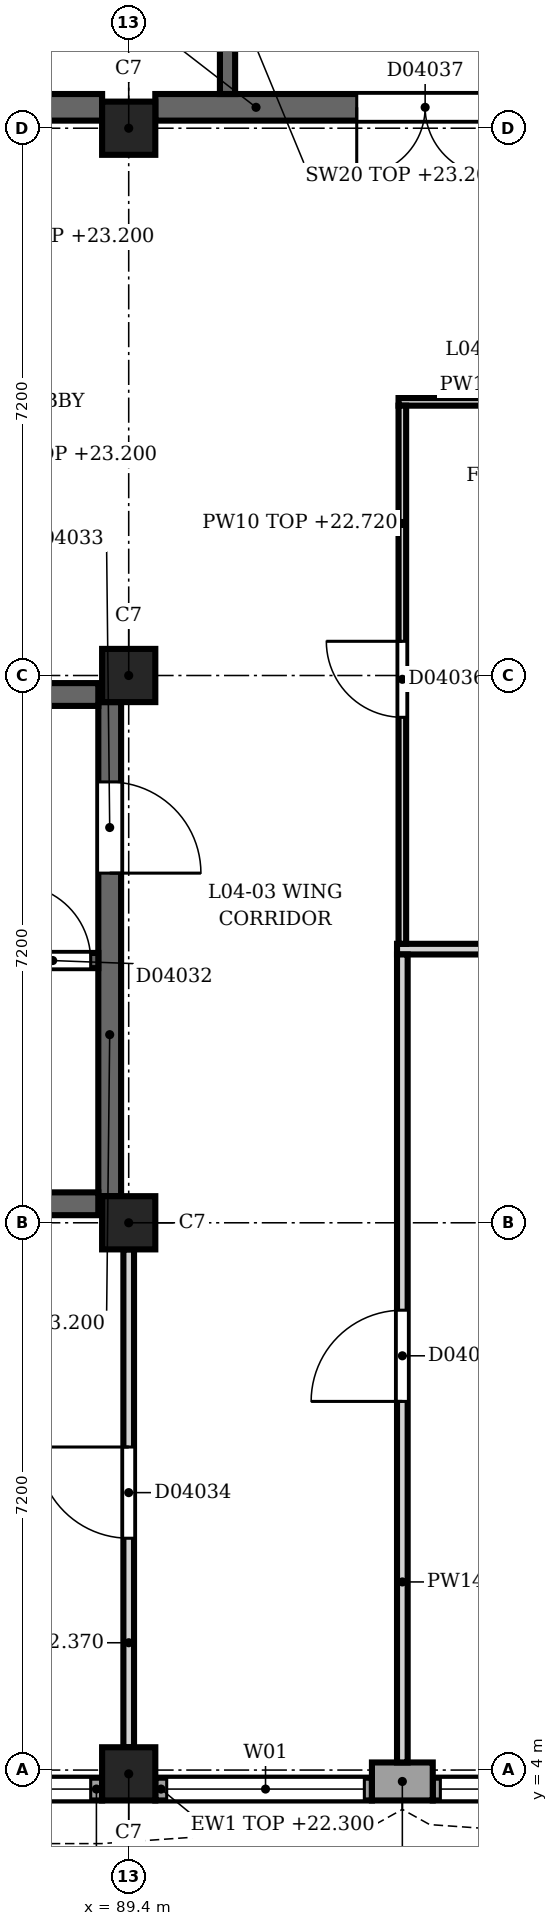
"""IFC4 building model, lengths in metres.
Left out: names, types, materials, properties, quantities, classifications, styles, units other than length and angle.
Written with IfcOpenShell. Run it as: python <this file> out.ifc"""

import sys

from ifc_helpers import new_model, si_unit, direction, frame, frame_2d, origin, origin_2d, place, context, subcontext, project, spatial, rectangle, extrude, element, fill, save


model = new_model("IFC4")
c1 = context("Model", 3, precision=1e-05, world=origin(), true_north=direction((0.0, 1.0)))
c2 = subcontext(c1, "Body", "Model", "MODEL_VIEW")
j1 = project(units=[si_unit("LENGTHUNIT", "METRE"), si_unit("PLANEANGLEUNIT", "RADIAN")], contexts=[c1])
p1 = place(None, origin())
s1 = spatial("IfcSite", under=j1, at=p1, CompositionType="ELEMENT")
p2 = place(p1, origin())
s2 = spatial("IfcBuilding", under=s1, at=p2, CompositionType="ELEMENT")
p3 = place(p2, frame((0.0, 0.0, 18.9)))
s3 = spatial("IfcBuildingStorey", under=s2, at=p3, CompositionType="ELEMENT", Elevation=18.9)
for number, where, z_axis, x_axis in (
    (1, (89.4, 3.95, 0.0), (0.0, 0.0, 1.0), (1.0, 0.0, 0.0)),
    (2, (89.4, 11.2, 0.0), (0.0, 0.0, 1.0), (1.0, 0.0, 0.0)),
    (3, (89.4, 18.4, 0.0), (0.0, 0.0, 1.0), (1.0, 0.0, 0.0)),
    (4, (89.4, 25.6, 0.0), (0.0, 0.0, 1.0), (1.0, 0.0, 0.0)),
):
    element("IfcColumn", number, at=place(p3, frame(where, z_axis=z_axis, x_axis=x_axis)), inside=s3, PredefinedType="COLUMN", context=c2, shape_type="SweptSolid", body=[
        extrude(rectangle(XDim=0.7, YDim=0.7, at=origin_2d()), origin(), (0.0, 0.0, 1.0), 4.5),
    ])
p4 = place(p3, frame((93.4, 3.85, 0.0), z_axis=(0.0, 0.0, 1.0), x_axis=(-1.0, 0.0, 0.0)))
e5 = element("IfcWall", 5, at=p4, inside=s3, PredefinedType="SOLIDWALL", context=c2, shape_type="SweptSolid", body=[
    extrude(rectangle(XDim=0.8, YDim=0.5, at=frame_2d((0.4, 0.0))), origin(), (0.0, 0.0, 1.0), 3.4),
])
p5 = place(p3, frame((96.25, 3.75, 0.0), z_axis=(0.0, 0.0, 1.0), x_axis=(-1.0, 0.0, 0.0)))
e6 = element("IfcWall", 6, at=p5, inside=s3, PredefinedType="SOLIDWALL", context=c2, shape_type="SweptSolid", body=[
    extrude(rectangle(XDim=2.85, YDim=0.3, at=frame_2d((1.425, 0.0))), origin(), (0.0, 0.0, 1.0), 3.4),
])
p6 = place(p5, frame((0.15, 0.0, 0.9)))
e7 = element("IfcOpeningElement", 7, at=p6, cuts=e6, PredefinedType="OPENING", context=c2, shape_type="SweptSolid", body=[
    extrude(rectangle(XDim=2.6, YDim=2.4, at=frame_2d((1.3, 1.2))), frame((0.0, 0.16, 0.0), z_axis=(0.0, -1.0, 0.0), x_axis=(1.0, 0.0, 0.0)), (0.0, 0.0, 1.0), 0.32),
])
p7 = place(p3, frame((92.6, 3.75, 0.0), z_axis=(0.0, 0.0, 1.0), x_axis=(-1.0, 0.0, 0.0)))
e8 = element("IfcWall", 8, at=p7, inside=s3, PredefinedType="SOLIDWALL", context=c2, shape_type="SweptSolid", body=[
    extrude(rectangle(XDim=2.85, YDim=0.3, at=frame_2d((1.425, 0.0))), origin(), (0.0, 0.0, 1.0), 3.4),
])
p8 = place(p7, frame((0.1, 0.0, 0.9)))
e9 = element("IfcOpeningElement", 9, at=p8, cuts=e8, PredefinedType="OPENING", context=c2, shape_type="SweptSolid", body=[
    extrude(rectangle(XDim=2.6, YDim=2.4, at=frame_2d((1.3, 1.2))), frame((0.0, 0.16, 0.0), z_axis=(0.0, -1.0, 0.0), x_axis=(1.0, 0.0, 0.0)), (0.0, 0.0, 1.0), 0.32),
])
p9 = place(p3, frame((89.05, 3.75, 0.0), z_axis=(0.0, 0.0, 1.0), x_axis=(-1.0, 0.0, 0.0)))
e10 = element("IfcWall", 10, at=p9, inside=s3, PredefinedType="SOLIDWALL", context=c2, shape_type="SweptSolid", body=[
    extrude(rectangle(XDim=2.85, YDim=0.3, at=frame_2d((1.425, 0.0))), origin(), (0.0, 0.0, 1.0), 3.4),
])
p10 = place(p9, frame((0.15, 0.0, 0.9)))
e11 = element("IfcOpeningElement", 11, at=p10, cuts=e10, PredefinedType="OPENING", context=c2, shape_type="SweptSolid", body=[
    extrude(rectangle(XDim=2.6, YDim=2.4, at=frame_2d((1.3, 1.2))), frame((0.0, 0.16, 0.0), z_axis=(0.0, -1.0, 0.0), x_axis=(1.0, 0.0, 0.0)), (0.0, 0.0, 1.0), 0.32),
])
p11 = place(p3, frame((82.55, 25.875, 0.0), z_axis=(0.0, 0.0, 1.0), x_axis=(1.0, 0.0, 0.0)))
e12 = element("IfcWall", 12, at=p11, inside=s3, PredefinedType="SHEAR", context=c2, shape_type="SweptSolid", body=[
    extrude(rectangle(XDim=6.5, YDim=0.35, at=frame_2d((3.25, 0.0))), origin(), (0.0, 0.0, 1.0), 4.3),
])
p12 = place(p11, frame((3.85, 0.0, 0.0)))
e13 = element("IfcOpeningElement", 13, at=p12, cuts=e12, PredefinedType="OPENING", context=c2, shape_type="SweptSolid", body=[
    extrude(rectangle(XDim=1.2, YDim=2.1, at=frame_2d((0.6, 1.05))), frame((0.0, 0.185, 0.0), z_axis=(0.0, -1.0, 0.0), x_axis=(1.0, 0.0, 0.0)), (0.0, 0.0, 1.0), 0.37),
])
p13 = place(p3, frame((89.75, 25.875, 0.0), z_axis=(0.0, 0.0, 1.0), x_axis=(1.0, 0.0, 0.0)))
e14 = element("IfcWall", 14, at=p13, inside=s3, PredefinedType="SHEAR", context=c2, shape_type="SweptSolid", body=[
    extrude(rectangle(XDim=6.5, YDim=0.35, at=frame_2d((3.25, 0.0))), origin(), (0.0, 0.0, 1.0), 4.3),
])
p14 = place(p13, frame((2.65, 0.0, 0.0)))
e15 = element("IfcOpeningElement", 15, at=p14, cuts=e14, PredefinedType="OPENING", context=c2, shape_type="SweptSolid", body=[
    extrude(rectangle(XDim=1.8, YDim=2.1, at=frame_2d((0.9, 1.05))), frame((0.0, 0.185, 0.0), z_axis=(0.0, -1.0, 0.0), x_axis=(1.0, 0.0, 0.0)), (0.0, 0.0, 1.0), 0.37),
])
p15 = place(p3, frame((90.7, 26.05, 0.0), z_axis=(0.0, 0.0, 1.0), x_axis=(0.0, 1.0, 0.0)))
e16 = element("IfcWall", 16, at=p15, inside=s3, PredefinedType="SHEAR", context=c2, shape_type="SweptSolid", body=[
    extrude(rectangle(XDim=3.05, YDim=0.2, at=frame_2d((1.525, 0.0))), origin(), (0.0, 0.0, 1.0), 4.3),
])
p16 = place(p3, frame((89.15, 11.55, 0.0), z_axis=(0.0, 0.0, 1.0), x_axis=(0.0, 1.0, 0.0)))
e17 = element("IfcWall", 17, at=p16, inside=s3, PredefinedType="SHEAR", context=c2, shape_type="SweptSolid", body=[
    extrude(rectangle(XDim=6.5, YDim=0.3, at=frame_2d((3.25, 0.0))), origin(), (0.0, 0.0, 1.0), 4.3),
])
p17 = place(p16, frame((4.25, 0.0, 0.0)))
e18 = element("IfcOpeningElement", 18, at=p17, cuts=e17, PredefinedType="OPENING", context=c2, shape_type="SweptSolid", body=[
    extrude(rectangle(XDim=1.2, YDim=2.1, at=frame_2d((0.6, 1.05))), frame((0.0, 0.16, 0.0), z_axis=(0.0, -1.0, 0.0), x_axis=(1.0, 0.0, 0.0)), (0.0, 0.0, 1.0), 0.32),
])
for number, where, z_axis, x_axis in (
    (19, (82.6, 11.45, 0.0), (0.0, 0.0, 1.0), (1.0, 0.0, 0.0)),
    (20, (82.6, 18.15, 0.0), (0.0, 0.0, 1.0), (1.0, 0.0, 0.0)),
):
    element("IfcWall", number, at=place(p3, frame(where, z_axis=z_axis, x_axis=x_axis)), inside=s3, PredefinedType="SHEAR", context=c2, shape_type="SweptSolid", body=[
        extrude(rectangle(XDim=6.4, YDim=0.3, at=frame_2d((3.2, 0.0))), origin(), (0.0, 0.0, 1.0), 4.3),
    ])
p18 = place(p3, frame((89.0, 14.65, 0.0), z_axis=(0.0, 0.0, 1.0), x_axis=(-1.0, 0.0, 0.0)))
e21 = element("IfcWall", 21, at=p18, inside=s3, PredefinedType="SHEAR", context=c2, shape_type="SweptSolid", body=[
    extrude(rectangle(XDim=6.4, YDim=0.2, at=frame_2d((3.2, 0.0))), origin(), (0.0, 0.0, 1.0), 4.3),
])
p19 = place(p18, frame((0.1, 0.0, 0.0)))
e22 = element("IfcOpeningElement", 22, at=p19, cuts=e21, PredefinedType="OPENING", context=c2, shape_type="SweptSolid", body=[
    extrude(rectangle(XDim=1.0, YDim=2.1, at=frame_2d((0.5, 1.05))), frame((0.0, 0.11, 0.0), z_axis=(0.0, -1.0, 0.0), x_axis=(1.0, 0.0, 0.0)), (0.0, 0.0, 1.0), 0.22),
])
p20 = place(p3, frame((92.93, 14.8, 0.0), z_axis=(0.0, 0.0, 1.0), x_axis=(1.0, 0.0, 0.0)))
e23 = element("IfcWall", 23, at=p20, inside=s3, PredefinedType="PARTITIONING", context=c2, shape_type="SweptSolid", body=[
    extrude(rectangle(XDim=10.77, YDim=0.14, at=frame_2d((5.385, 0.0))), origin(), (0.0, 0.0, 1.0), 4.3),
])
p21 = place(p3, frame((92.95, 22.0, 0.0), z_axis=(0.0, 0.0, 1.0), x_axis=(1.0, 0.0, 0.0)))
e24 = element("IfcWall", 24, at=p21, inside=s3, PredefinedType="PARTITIONING", context=c2, shape_type="SweptSolid", body=[
    extrude(rectangle(XDim=3.65, YDim=0.1, at=frame_2d((1.825, 0.0))), origin(), (0.0, 0.0, 1.0), 4.3),
])
p22 = place(p3, frame((89.4, 4.3, 0.0), z_axis=(0.0, 0.0, 1.0), x_axis=(0.0, 1.0, 0.0)))
e25 = element("IfcWall", 25, at=p22, inside=s3, PredefinedType="PARTITIONING", context=c2, shape_type="SweptSolid", body=[
    extrude(rectangle(XDim=6.55, YDim=0.14, at=frame_2d((3.275, 0.0))), origin(), (0.0, 0.0, 1.0), 3.47),
])
p23 = place(p22, frame((2.75, 0.0, 0.0)))
e26 = element("IfcOpeningElement", 26, at=p23, cuts=e25, PredefinedType="OPENING", context=c2, shape_type="SweptSolid", body=[
    extrude(rectangle(XDim=1.2, YDim=2.1, at=frame_2d((0.6, 1.05))), frame((0.0, 0.08, 0.0), z_axis=(0.0, -1.0, 0.0), x_axis=(1.0, 0.0, 0.0)), (0.0, 0.0, 1.0), 0.16),
])
p24 = place(p3, frame((93.0, 14.73, 0.0), z_axis=(0.0, 0.0, 1.0), x_axis=(0.0, -1.0, 0.0)))
e27 = element("IfcWall", 27, at=p24, inside=s3, PredefinedType="PARTITIONING", context=c2, shape_type="SweptSolid", body=[
    extrude(rectangle(XDim=10.63, YDim=0.14, at=frame_2d((5.315, 0.0))), origin(), (0.0, 0.0, 1.0), 3.82),
])
p25 = place(p24, frame((4.68, 0.0, 0.0)))
e28 = element("IfcOpeningElement", 28, at=p25, cuts=e27, PredefinedType="OPENING", context=c2, shape_type="SweptSolid", body=[
    extrude(rectangle(XDim=1.2, YDim=2.1, at=frame_2d((0.6, 1.05))), frame((0.0, 0.08, 0.0), z_axis=(0.0, -1.0, 0.0), x_axis=(1.0, 0.0, 0.0)), (0.0, 0.0, 1.0), 0.16),
])
p26 = place(p3, frame((93.0, 21.95, 0.0), z_axis=(0.0, 0.0, 1.0), x_axis=(0.0, -1.0, 0.0)))
e29 = element("IfcWall", 29, at=p26, inside=s3, PredefinedType="PARTITIONING", context=c2, shape_type="SweptSolid", body=[
    extrude(rectangle(XDim=7.08, YDim=0.1, at=frame_2d((3.54, 0.0))), origin(), (0.0, 0.0, 1.0), 3.82),
])
p27 = place(p26, frame((3.1, 0.0, 0.0)))
e30 = element("IfcOpeningElement", 30, at=p27, cuts=e29, PredefinedType="OPENING", context=c2, shape_type="SweptSolid", body=[
    extrude(rectangle(XDim=1.0, YDim=2.1, at=frame_2d((0.5, 1.05))), frame((0.0, 0.06, 0.0), z_axis=(0.0, -1.0, 0.0), x_axis=(1.0, 0.0, 0.0)), (0.0, 0.0, 1.0), 0.12),
])
p28 = place(p6, origin())
e31 = element("IfcWindow", 31, at=p28, inside=s3, PartitioningType="SINGLE_PANEL", PredefinedType="WINDOW", context=c2, shape_type="SweptSolid", body=[
    extrude(rectangle(XDim=2.6, YDim=2.4, at=frame_2d((1.3, 1.2))), frame((0.0, 0.03, 0.0), z_axis=(0.0, -1.0, 0.0), x_axis=(1.0, 0.0, 0.0)), (0.0, 0.0, 1.0), 0.06),
])
fill(e7, e31)
p29 = place(p8, origin())
e32 = element("IfcWindow", 32, at=p29, inside=s3, PartitioningType="SINGLE_PANEL", PredefinedType="WINDOW", context=c2, shape_type="SweptSolid", body=[
    extrude(rectangle(XDim=2.6, YDim=2.4, at=frame_2d((1.3, 1.2))), frame((0.0, 0.03, 0.0), z_axis=(0.0, -1.0, 0.0), x_axis=(1.0, 0.0, 0.0)), (0.0, 0.0, 1.0), 0.06),
])
fill(e9, e32)
p30 = place(p10, origin())
e33 = element("IfcWindow", 33, at=p30, inside=s3, PartitioningType="SINGLE_PANEL", PredefinedType="WINDOW", context=c2, shape_type="SweptSolid", body=[
    extrude(rectangle(XDim=2.6, YDim=2.4, at=frame_2d((1.3, 1.2))), frame((0.0, 0.03, 0.0), z_axis=(0.0, -1.0, 0.0), x_axis=(1.0, 0.0, 0.0)), (0.0, 0.0, 1.0), 0.06),
])
fill(e11, e33)
p31 = place(p14, origin())
e34 = element("IfcDoor", 34, at=p31, inside=s3, OperationType="SINGLE_SWING_LEFT", PredefinedType="DOOR", context=c2, shape_type="SweptSolid", body=[
    extrude(rectangle(XDim=1.8, YDim=2.1, at=frame_2d((0.9, 1.05))), frame((0.0, 0.025, 0.0), z_axis=(0.0, -1.0, 0.0), x_axis=(1.0, 0.0, 0.0)), (0.0, 0.0, 1.0), 0.05),
])
fill(e15, e34)
p32 = place(p17, origin())
e35 = element("IfcDoor", 35, at=p32, inside=s3, OperationType="SINGLE_SWING_RIGHT", PredefinedType="DOOR", context=c2, shape_type="SweptSolid", body=[
    extrude(rectangle(XDim=1.2, YDim=2.1, at=frame_2d((0.6, 1.05))), frame((0.0, 0.025, 0.0), z_axis=(0.0, -1.0, 0.0), x_axis=(1.0, 0.0, 0.0)), (0.0, 0.0, 1.0), 0.05),
])
fill(e18, e35)
p33 = place(p19, origin())
e36 = element("IfcDoor", 36, at=p33, inside=s3, OperationType="SINGLE_SWING_LEFT", PredefinedType="DOOR", context=c2, shape_type="SweptSolid", body=[
    extrude(rectangle(XDim=1.0, YDim=2.1, at=frame_2d((0.5, 1.05))), frame((0.0, 0.025, 0.0), z_axis=(0.0, -1.0, 0.0), x_axis=(1.0, 0.0, 0.0)), (0.0, 0.0, 1.0), 0.05),
])
fill(e22, e36)
p34 = place(p23, origin())
e37 = element("IfcDoor", 37, at=p34, inside=s3, OperationType="SINGLE_SWING_RIGHT", PredefinedType="DOOR", context=c2, shape_type="SweptSolid", body=[
    extrude(rectangle(XDim=1.2, YDim=2.1, at=frame_2d((0.6, 1.05))), frame((0.0, 0.025, 0.0), z_axis=(0.0, -1.0, 0.0), x_axis=(1.0, 0.0, 0.0)), (0.0, 0.0, 1.0), 0.05),
])
fill(e26, e37)
p35 = place(p25, origin())
e38 = element("IfcDoor", 38, at=p35, inside=s3, OperationType="SINGLE_SWING_LEFT", PredefinedType="DOOR", context=c2, shape_type="SweptSolid", body=[
    extrude(rectangle(XDim=1.2, YDim=2.1, at=frame_2d((0.6, 1.05))), frame((0.0, 0.025, 0.0), z_axis=(0.0, -1.0, 0.0), x_axis=(1.0, 0.0, 0.0)), (0.0, 0.0, 1.0), 0.05),
])
fill(e28, e38)
p36 = place(p27, origin())
e39 = element("IfcDoor", 39, at=p36, inside=s3, OperationType="SINGLE_SWING_RIGHT", PredefinedType="DOOR", context=c2, shape_type="SweptSolid", body=[
    extrude(rectangle(XDim=1.0, YDim=2.1, at=frame_2d((0.5, 1.05))), frame((0.0, 0.025, 0.0), z_axis=(0.0, -1.0, 0.0), x_axis=(1.0, 0.0, 0.0)), (0.0, 0.0, 1.0), 0.05),
])
fill(e30, e39)
save(model, sys.argv[1])
